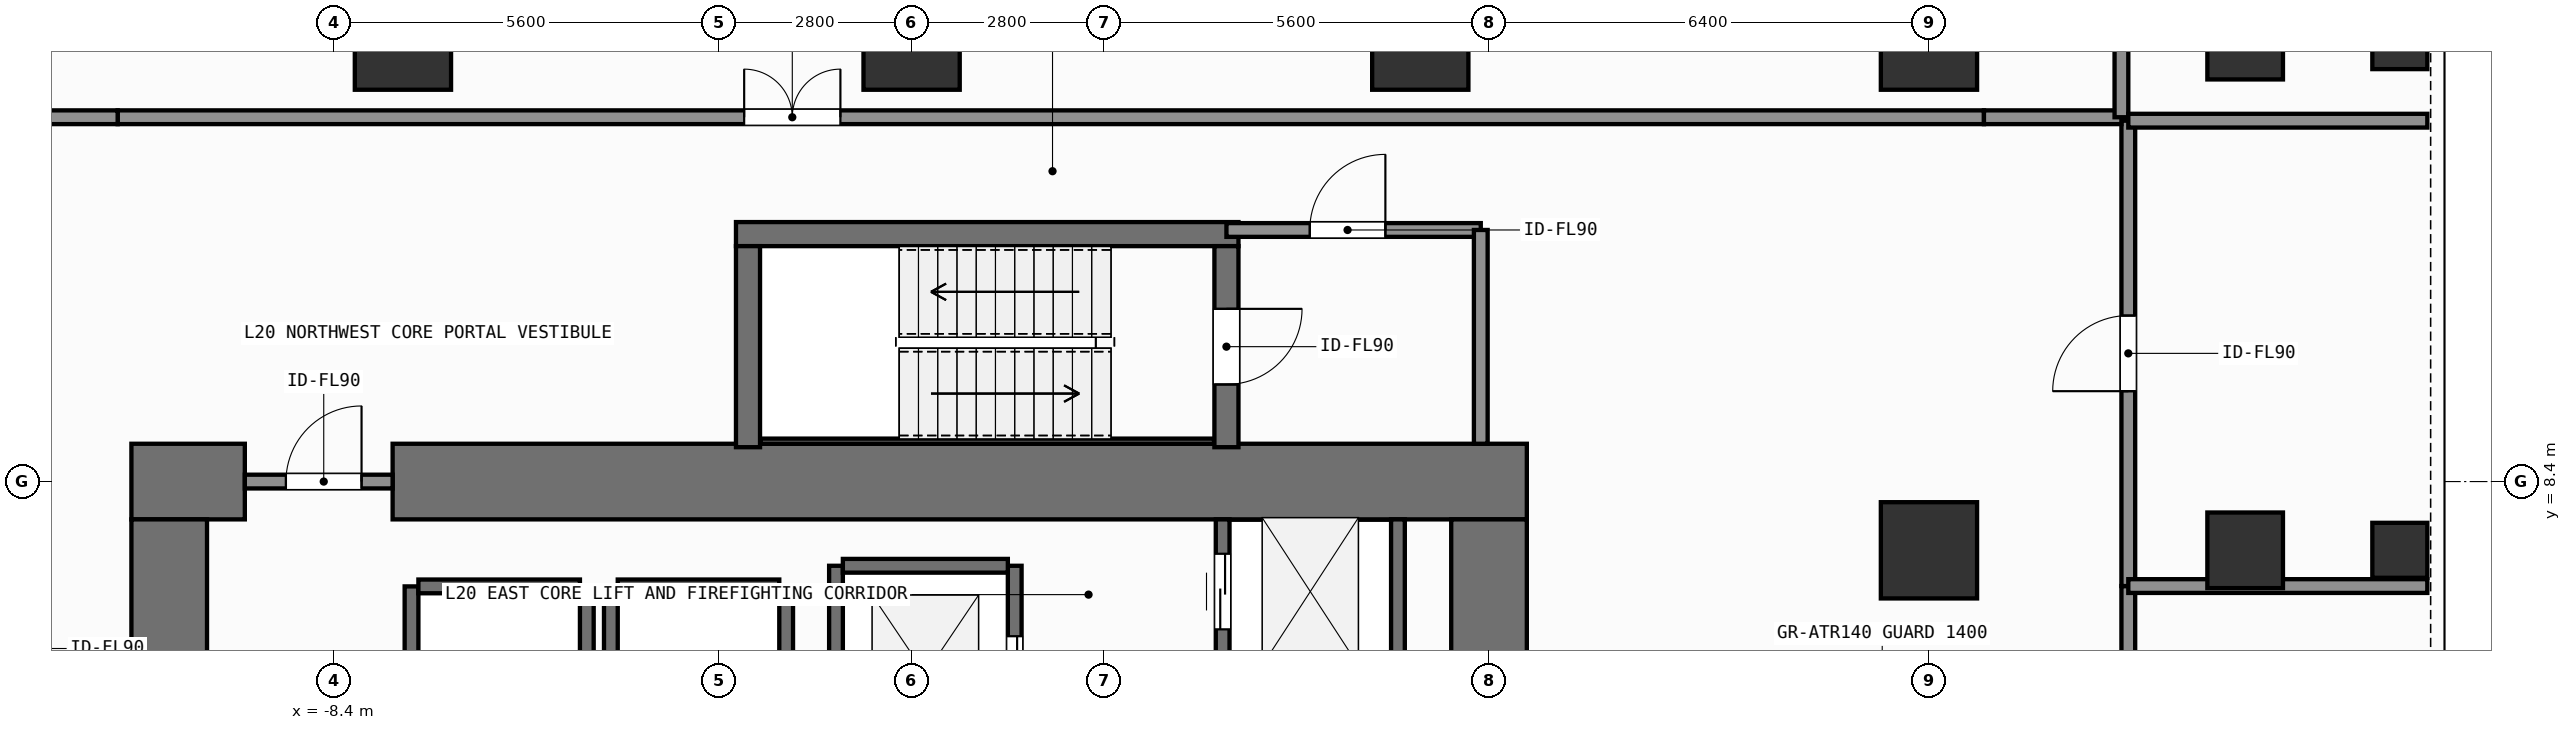
"""IFC4 building model, lengths in metres.
Left out: names, types, materials, properties, quantities, classifications, styles, units other than length and angle.
Written with IfcOpenShell. Run it as: python <this file> out.ifc"""

import sys

from ifc_helpers import new_model, si_unit, direction, frame, frame_2d, origin, origin_2d, place, context, subcontext, project, spatial, rectangle, hollow_rectangle, extrude, element, fill, save


model = new_model("IFC4")
c1 = context("Model", 3, precision=1e-05, world=origin(), true_north=direction((0.0, 1.0)))
c2 = subcontext(c1, "Body", "Model", "MODEL_VIEW")
j1 = project(units=[si_unit("LENGTHUNIT", "METRE"), si_unit("PLANEANGLEUNIT", "RADIAN")], contexts=[c1])
p1 = place(None, origin())
s1 = spatial("IfcSite", under=j1, at=p1, CompositionType="ELEMENT")
p2 = place(p1, origin())
s2 = spatial("IfcBuilding", under=s1, at=p2, CompositionType="ELEMENT")
p3 = place(p2, frame((0.0, 0.0, 77.4)))
s3 = spatial("IfcBuildingStorey", under=s2, at=p3, CompositionType="ELEMENT", Elevation=77.4)
p4 = place(p3, frame((-11.35, 8.4, 0.0), z_axis=(0.0, 0.0, 1.0), x_axis=(1.0, 0.0, 0.0)))
e1 = element("IfcWall", 1, at=p4, inside=s3, PredefinedType="SHEAR", context=c2, shape_type="SweptSolid", body=[
    extrude(rectangle(XDim=1.65, YDim=1.1, at=frame_2d((0.825, 0.0))), origin(), (0.0, 0.0, 1.0), 7.8),
])
p5 = place(p3, frame((-7.55, 8.4, 0.0), z_axis=(0.0, 0.0, 1.0), x_axis=(1.0, 0.0, 0.0)))
e2 = element("IfcWall", 2, at=p5, inside=s3, PredefinedType="SHEAR", context=c2, shape_type="SweptSolid", body=[
    extrude(rectangle(XDim=16.5, YDim=1.1, at=frame_2d((8.25, 0.0))), origin(), (0.0, 0.0, 1.0), 7.8),
])
p6 = place(p3, frame((-10.8, -7.85, 0.0), z_axis=(0.0, 0.0, 1.0), x_axis=(0.0, 1.0, 0.0)))
e3 = element("IfcWall", 3, at=p6, inside=s3, PredefinedType="SHEAR", context=c2, shape_type="SweptSolid", body=[
    extrude(rectangle(XDim=15.7, YDim=1.1, at=frame_2d((7.85, 0.0))), origin(), (0.0, 0.0, 1.0), 7.8),
])
p7 = place(p3, frame((8.4, 5.825, 0.0), z_axis=(0.0, 0.0, 1.0), x_axis=(0.0, 1.0, 0.0)))
e4 = element("IfcWall", 4, at=p7, inside=s3, PredefinedType="SHEAR", context=c2, shape_type="SweptSolid", body=[
    extrude(rectangle(XDim=2.025, YDim=1.1, at=frame_2d((1.013, 0.0))), origin(), (0.0, 0.0, 1.0), 7.8),
])
p8 = place(p3, frame((-2.555, 12.0, 0.0), z_axis=(0.0, 0.0, 1.0), x_axis=(1.0, 0.0, 0.0)))
e5 = element("IfcWall", 5, at=p8, inside=s3, PredefinedType="SHEAR", context=c2, shape_type="SweptSolid", body=[
    extrude(rectangle(XDim=7.31, YDim=0.35, at=frame_2d((3.655, 0.0))), origin(), (0.0, 0.0, 1.0), 7.8),
])
p9 = place(p3, frame((-2.2, 8.988, 0.0), z_axis=(0.0, 0.0, 1.0), x_axis=(1.0, 0.0, 0.0)))
e6 = element("IfcWall", 6, at=p9, inside=s3, PredefinedType="SHEAR", context=c2, shape_type="SweptSolid", body=[
    extrude(rectangle(XDim=6.6, YDim=0.075, at=frame_2d((3.3, 0.0))), origin(), (0.0, 0.0, 1.0), 7.8),
])
p10 = place(p3, frame((-2.38, 8.9, 0.0), z_axis=(0.0, 0.0, 1.0), x_axis=(0.0, 1.0, 0.0)))
e7 = element("IfcWall", 7, at=p10, inside=s3, PredefinedType="SHEAR", context=c2, shape_type="SweptSolid", body=[
    extrude(rectangle(XDim=2.925, YDim=0.35, at=frame_2d((1.462, 0.0))), origin(), (0.0, 0.0, 1.0), 7.8),
])
p11 = place(p3, frame((4.58, 11.825, 0.0), z_axis=(0.0, 0.0, 1.0), x_axis=(0.0, -1.0, 0.0)))
e8 = element("IfcWall", 8, at=p11, inside=s3, PredefinedType="SHEAR", context=c2, shape_type="SweptSolid", body=[
    extrude(rectangle(XDim=2.925, YDim=0.35, at=frame_2d((1.462, 0.0))), origin(), (0.0, 0.0, 1.0), 7.8),
])
p12 = place(p11, frame((0.913, 0.0, 0.0)))
e9 = element("IfcOpeningElement", 9, at=p12, cuts=e8, PredefinedType="OPENING", context=c2, shape_type="SweptSolid", body=[
    extrude(rectangle(XDim=1.1, YDim=2.15, at=frame_2d((0.55, 1.075))), frame((0.0, 0.185, 0.0), z_axis=(0.0, -1.0, 0.0), x_axis=(1.0, 0.0, 0.0)), (0.0, 0.0, 1.0), 0.37),
])
for number, where, z_axis, x_axis in (
    (10, (-7.4, 14.8, 0.0), (0.0, 0.0, 1.0), (1.0, 0.0, 0.0)),
    (11, (0.0, 14.8, 0.0), (0.0, 0.0, 1.0), (1.0, 0.0, 0.0)),
    (12, (7.4, 14.8, 0.0), (0.0, 0.0, 1.0), (1.0, 0.0, 0.0)),
    (13, (14.8, 14.8, 0.0), (0.0, 0.0, 1.0), (1.0, 0.0, 0.0)),
    (14, (14.8, 7.4, 0.0), (0.0, 0.0, 1.0), (1.0, 0.0, 0.0)),
):
    element("IfcColumn", number, at=place(p3, frame(where, z_axis=z_axis, x_axis=x_axis)), inside=s3, PredefinedType="COLUMN", context=c2, shape_type="SweptSolid", body=[
        extrude(rectangle(XDim=1.4, YDim=1.4, at=origin_2d()), origin(), (0.0, 0.0, 1.0), 7.8),
    ])
for number, where, z_axis, x_axis in (
    (15, (19.4, 7.4, 0.0), (0.0, 0.0, 1.0), (1.0, 0.0, 0.0)),
    (16, (19.4, 14.8, 0.0), (0.0, 0.0, 1.0), (1.0, 0.0, 0.0)),
):
    element("IfcColumn", number, at=place(p3, frame(where, z_axis=z_axis, x_axis=x_axis)), inside=s3, PredefinedType="COLUMN", context=c2, shape_type="SweptSolid", body=[
        extrude(rectangle(XDim=1.1, YDim=1.1, at=origin_2d()), origin(), (0.0, 0.0, 1.0), 7.8),
    ])
for number, where, z_axis, x_axis in (
    (17, (21.65, 7.4, 0.0), (0.0, 0.0, 1.0), (1.0, 0.0, 0.0)),
    (18, (21.65, 14.8, 0.0), (0.0, 0.0, 1.0), (1.0, 0.0, 0.0)),
):
    element("IfcColumn", number, at=place(p3, frame(where, z_axis=z_axis, x_axis=x_axis)), inside=s3, PredefinedType="COLUMN", context=c2, shape_type="SweptSolid", body=[
        extrude(hollow_rectangle(XDim=0.8, YDim=0.8, WallThickness=0.036, at=origin_2d()), origin(), (0.0, 0.0, 1.0), 7.8),
    ])
for number, where, z_axis, x_axis in (
    (19, (-7.275, 4.075, 0.0), (0.0, 0.0, 1.0), (0.0, 1.0, 0.0)),
    (20, (-4.725, 4.075, 0.0), (0.0, 0.0, 1.0), (0.0, 1.0, 0.0)),
):
    element("IfcWall", number, at=place(p3, frame(where, z_axis=z_axis, x_axis=x_axis)), inside=s3, PredefinedType="SHEAR", context=c2, shape_type="SweptSolid", body=[
        extrude(rectangle(XDim=2.8, YDim=0.2, at=frame_2d((1.4, 0.0))), origin(), (0.0, 0.0, 1.0), 7.52),
    ])
p13 = place(p3, frame((-7.175, 6.875, 0.0), z_axis=(0.0, 0.0, 1.0), x_axis=(1.0, 0.0, 0.0)))
e21 = element("IfcWall", 21, at=p13, inside=s3, PredefinedType="SHEAR", context=c2, shape_type="SweptSolid", body=[
    extrude(rectangle(XDim=2.35, YDim=0.2, at=frame_2d((1.175, 0.0))), origin(), (0.0, 0.0, 1.0), 7.52),
])
for number, where, z_axis, x_axis in (
    (22, (-4.375, 4.325, 0.0), (0.0, 0.0, 1.0), (0.0, 1.0, 0.0)),
    (23, (-1.825, 4.325, 0.0), (0.0, 0.0, 1.0), (0.0, 1.0, 0.0)),
):
    element("IfcWall", number, at=place(p3, frame(where, z_axis=z_axis, x_axis=x_axis)), inside=s3, PredefinedType="SHEAR", context=c2, shape_type="SweptSolid", body=[
        extrude(rectangle(XDim=2.55, YDim=0.2, at=frame_2d((1.275, 0.0))), origin(), (0.0, 0.0, 1.0), 7.52),
    ])
p14 = place(p3, frame((-4.275, 6.875, 0.0), z_axis=(0.0, 0.0, 1.0), x_axis=(1.0, 0.0, 0.0)))
e24 = element("IfcWall", 24, at=p14, inside=s3, PredefinedType="SHEAR", context=c2, shape_type="SweptSolid", body=[
    extrude(rectangle(XDim=2.35, YDim=0.2, at=frame_2d((1.175, 0.0))), origin(), (0.0, 0.0, 1.0), 7.52),
])
p15 = place(p3, frame((-1.1, 4.025, 0.0), z_axis=(0.0, 0.0, 1.0), x_axis=(0.0, 1.0, 0.0)))
e25 = element("IfcWall", 25, at=p15, inside=s3, PredefinedType="SHEAR", context=c2, shape_type="SweptSolid", body=[
    extrude(rectangle(XDim=3.15, YDim=0.2, at=frame_2d((1.575, 0.0))), origin(), (0.0, 0.0, 1.0), 7.52),
])
p16 = place(p3, frame((1.5, 4.025, 0.0), z_axis=(0.0, 0.0, 1.0), x_axis=(0.0, 1.0, 0.0)))
e26 = element("IfcWall", 26, at=p16, inside=s3, PredefinedType="SHEAR", context=c2, shape_type="SweptSolid", body=[
    extrude(rectangle(XDim=3.15, YDim=0.2, at=frame_2d((1.575, 0.0))), origin(), (0.0, 0.0, 1.0), 7.52),
])
p17 = place(p16, frame((1.025, 0.0, 0.0)))
e27 = element("IfcOpeningElement", 27, at=p17, cuts=e26, PredefinedType="OPENING", context=c2, shape_type="SweptSolid", body=[
    extrude(rectangle(XDim=1.1, YDim=2.2, at=frame_2d((0.55, 1.1))), frame((0.0, 0.11, 0.0), z_axis=(0.0, -1.0, 0.0), x_axis=(1.0, 0.0, 0.0)), (0.0, 0.0, 1.0), 0.22),
])
p18 = place(p3, frame((-1.0, 7.175, 0.0), z_axis=(0.0, 0.0, 1.0), x_axis=(1.0, 0.0, 0.0)))
e28 = element("IfcWall", 28, at=p18, inside=s3, PredefinedType="SHEAR", context=c2, shape_type="SweptSolid", body=[
    extrude(rectangle(XDim=2.4, YDim=0.2, at=frame_2d((1.2, 0.0))), origin(), (0.0, 0.0, 1.0), 7.52),
])
p19 = place(p3, frame((4.525, 5.825, 0.0), z_axis=(0.0, 0.0, 1.0), x_axis=(0.0, 1.0, 0.0)))
e29 = element("IfcWall", 29, at=p19, inside=s3, PredefinedType="SHEAR", context=c2, shape_type="SweptSolid", body=[
    extrude(rectangle(XDim=2.025, YDim=0.2, at=frame_2d((1.013, 0.0))), origin(), (0.0, 0.0, 1.0), 7.52),
])
p20 = place(p19, frame((0.425, 0.0, 0.0)))
e30 = element("IfcOpeningElement", 30, at=p20, cuts=e29, PredefinedType="OPENING", context=c2, shape_type="SweptSolid", body=[
    extrude(rectangle(XDim=1.1, YDim=2.2, at=frame_2d((0.55, 1.1))), frame((0.0, 0.11, 0.0), z_axis=(0.0, -1.0, 0.0), x_axis=(1.0, 0.0, 0.0)), (0.0, 0.0, 1.0), 0.22),
])
p21 = place(p3, frame((7.075, 5.825, 0.0), z_axis=(0.0, 0.0, 1.0), x_axis=(0.0, 1.0, 0.0)))
e31 = element("IfcWall", 31, at=p21, inside=s3, PredefinedType="SHEAR", context=c2, shape_type="SweptSolid", body=[
    extrude(rectangle(XDim=2.025, YDim=0.2, at=frame_2d((1.013, 0.0))), origin(), (0.0, 0.0, 1.0), 7.52),
])
p22 = place(p3, frame((4.58, 12.06, 0.0), z_axis=(0.0, 0.0, 1.0), x_axis=(1.0, 0.0, 0.0)))
e32 = element("IfcWall", 32, at=p22, inside=s3, PredefinedType="SOLIDWALL", context=c2, shape_type="SweptSolid", body=[
    extrude(rectangle(XDim=3.7, YDim=0.2, at=frame_2d((1.85, 0.0))), origin(), (0.0, 0.0, 1.0), 7.52),
])
p23 = place(p22, frame((1.212, 0.0, 0.0)))
e33 = element("IfcOpeningElement", 33, at=p23, cuts=e32, PredefinedType="OPENING", context=c2, shape_type="SweptSolid", body=[
    extrude(rectangle(XDim=1.1, YDim=2.15, at=frame_2d((0.55, 1.075))), frame((0.0, 0.11, 0.0), z_axis=(0.0, -1.0, 0.0), x_axis=(1.0, 0.0, 0.0)), (0.0, 0.0, 1.0), 0.22),
])
p24 = place(p3, frame((-9.7, 8.4, 0.0), z_axis=(0.0, 0.0, 1.0), x_axis=(1.0, 0.0, 0.0)))
e34 = element("IfcWall", 34, at=p24, inside=s3, PredefinedType="SOLIDWALL", context=c2, shape_type="SweptSolid", body=[
    extrude(rectangle(XDim=2.15, YDim=0.2, at=frame_2d((1.075, 0.0))), origin(), (0.0, 0.0, 1.0), 6.56),
])
p25 = place(p24, frame((0.598, 0.0, 0.0)))
e35 = element("IfcOpeningElement", 35, at=p25, cuts=e34, PredefinedType="OPENING", context=c2, shape_type="SweptSolid", body=[
    extrude(rectangle(XDim=1.1, YDim=2.15, at=frame_2d((0.55, 1.075))), frame((0.0, 0.11, 0.0), z_axis=(0.0, -1.0, 0.0), x_axis=(1.0, 0.0, 0.0)), (0.0, 0.0, 1.0), 0.22),
])
p26 = place(p3, frame((-11.55, 13.7, 0.0), z_axis=(0.0, 0.0, 1.0), x_axis=(1.0, 0.0, 0.0)))
e36 = element("IfcWall", 36, at=p26, inside=s3, PredefinedType="SOLIDWALL", context=c2, shape_type="SweptSolid", body=[
    extrude(rectangle(XDim=27.15, YDim=0.2, at=frame_2d((13.575, 0.0))), origin(), (0.0, 0.0, 1.0), 7.52),
])
p27 = place(p26, frame((9.114, 0.0, 0.0)))
e37 = element("IfcOpeningElement", 37, at=p27, cuts=e36, PredefinedType="OPENING", context=c2, shape_type="SweptSolid", body=[
    extrude(rectangle(XDim=1.4, YDim=2.2, at=frame_2d((0.7, 1.1))), frame((0.0, 0.11, 0.0), z_axis=(0.0, -1.0, 0.0), x_axis=(1.0, 0.0, 0.0)), (0.0, 0.0, 1.0), 0.22),
])
p28 = place(p3, frame((17.7, 2.58, 0.0), z_axis=(0.0, 0.0, 1.0), x_axis=(0.0, 1.0, 0.0)))
e38 = element("IfcWall", 38, at=p28, inside=s3, PredefinedType="SOLIDWALL", context=c2, shape_type="SweptSolid", body=[
    extrude(rectangle(XDim=4.3, YDim=0.2, at=frame_2d((2.15, 0.0))), origin(), (0.0, 0.0, 1.0), 7.52),
])
p29 = place(p28, frame((1.725, 0.0, 0.0)))
e39 = element("IfcOpeningElement", 39, at=p29, cuts=e38, PredefinedType="OPENING", context=c2, shape_type="SweptSolid", body=[
    extrude(rectangle(XDim=0.85, YDim=2.1, at=frame_2d((0.425, 1.05))), frame((0.0, 0.11, 0.0), z_axis=(0.0, -1.0, 0.0), x_axis=(1.0, 0.0, 0.0)), (0.0, 0.0, 1.0), 0.22),
])
p30 = place(p3, frame((17.7, 6.88, 0.0), z_axis=(0.0, 0.0, 1.0), x_axis=(0.0, 1.0, 0.0)))
e40 = element("IfcWall", 40, at=p30, inside=s3, PredefinedType="SOLIDWALL", context=c2, shape_type="SweptSolid", body=[
    extrude(rectangle(XDim=6.77, YDim=0.2, at=frame_2d((3.385, 0.0))), origin(), (0.0, 0.0, 1.0), 7.52),
])
p31 = place(p30, frame((2.835, 0.0, 0.0)))
e41 = element("IfcOpeningElement", 41, at=p31, cuts=e40, PredefinedType="OPENING", context=c2, shape_type="SweptSolid", body=[
    extrude(rectangle(XDim=1.1, YDim=2.15, at=frame_2d((0.55, 1.075))), frame((0.0, 0.11, 0.0), z_axis=(0.0, -1.0, 0.0), x_axis=(1.0, 0.0, 0.0)), (0.0, 0.0, 1.0), 0.22),
])
p32 = place(p3, frame((8.28, 8.95, 0.0), z_axis=(0.0, 0.0, 1.0), x_axis=(0.0, 1.0, 0.0)))
e42 = element("IfcWall", 42, at=p32, inside=s3, PredefinedType="SOLIDWALL", context=c2, shape_type="SweptSolid", body=[
    extrude(rectangle(XDim=3.11, YDim=0.2, at=frame_2d((1.555, 0.0))), origin(), (0.0, 0.0, 1.0), 7.52),
])
p33 = place(p3, frame((-13.5, 13.7, 0.0), z_axis=(0.0, 0.0, 1.0), x_axis=(1.0, 0.0, 0.0)))
e43 = element("IfcWall", 43, at=p33, inside=s3, PredefinedType="SOLIDWALL", context=c2, shape_type="SweptSolid", body=[
    extrude(rectangle(XDim=1.95, YDim=0.2, at=frame_2d((0.975, 0.0))), origin(), (0.0, 0.0, 1.0), 7.52),
])
p34 = place(p3, frame((15.6, 13.7, 0.0), z_axis=(0.0, 0.0, 1.0), x_axis=(1.0, 0.0, 0.0)))
e44 = element("IfcWall", 44, at=p34, inside=s3, PredefinedType="SOLIDWALL", context=c2, shape_type="SweptSolid", body=[
    extrude(rectangle(XDim=2.0, YDim=0.2, at=frame_2d((1.0, 0.0))), origin(), (0.0, 0.0, 1.0), 7.52),
])
p35 = place(p3, frame((17.6, 13.7, 0.0), z_axis=(0.0, 0.0, 1.0), x_axis=(0.0, 1.0, 0.0)))
e45 = element("IfcWall", 45, at=p35, inside=s3, PredefinedType="SOLIDWALL", context=c2, shape_type="SweptSolid", body=[
    extrude(rectangle(XDim=11.25, YDim=0.2, at=frame_2d((5.625, 0.0))), origin(), (0.0, 0.0, 1.0), 7.52),
])
for number, where, z_axis, x_axis in (
    (46, (17.7, 13.65, 0.0), (0.0, 0.0, 1.0), (1.0, 0.0, 0.0)),
    (47, (17.7, 6.88, 0.0), (0.0, 0.0, 1.0), (1.0, 0.0, 0.0)),
):
    element("IfcWall", number, at=place(p3, frame(where, z_axis=z_axis, x_axis=x_axis)), inside=s3, PredefinedType="SOLIDWALL", context=c2, shape_type="SweptSolid", body=[
        extrude(rectangle(XDim=4.35, YDim=0.2, at=frame_2d((2.175, 0.0))), origin(), (0.0, 0.0, 1.0), 7.52),
    ])
p36 = place(p17, origin())
e48 = element("IfcDoor", 48, at=p36, inside=s3, OperationType="SLIDING_TO_LEFT", PredefinedType="DOOR", context=c2, shape_type="SweptSolid", body=[
    extrude(rectangle(XDim=1.1, YDim=2.2, at=frame_2d((0.55, 1.1))), frame((0.0, 0.025, 0.0), z_axis=(0.0, -1.0, 0.0), x_axis=(1.0, 0.0, 0.0)), (0.0, 0.0, 1.0), 0.05),
])
fill(e27, e48)
p37 = place(p20, origin())
e49 = element("IfcDoor", 49, at=p37, inside=s3, OperationType="SLIDING_TO_LEFT", PredefinedType="DOOR", context=c2, shape_type="SweptSolid", body=[
    extrude(rectangle(XDim=1.1, YDim=2.2, at=frame_2d((0.55, 1.1))), frame((0.0, 0.025, 0.0), z_axis=(0.0, -1.0, 0.0), x_axis=(1.0, 0.0, 0.0)), (0.0, 0.0, 1.0), 0.05),
])
fill(e30, e49)
p38 = place(p12, origin())
e50 = element("IfcDoor", 50, at=p38, inside=s3, OperationType="SINGLE_SWING_LEFT", PredefinedType="DOOR", context=c2, shape_type="SweptSolid", body=[
    extrude(rectangle(XDim=1.1, YDim=2.15, at=frame_2d((0.55, 1.075))), frame((0.0, 0.025, 0.0), z_axis=(0.0, -1.0, 0.0), x_axis=(1.0, 0.0, 0.0)), (0.0, 0.0, 1.0), 0.05),
])
fill(e9, e50)
p39 = place(p23, origin())
e51 = element("IfcDoor", 51, at=p39, inside=s3, OperationType="SINGLE_SWING_RIGHT", PredefinedType="DOOR", context=c2, shape_type="SweptSolid", body=[
    extrude(rectangle(XDim=1.1, YDim=2.15, at=frame_2d((0.55, 1.075))), frame((0.0, 0.025, 0.0), z_axis=(0.0, -1.0, 0.0), x_axis=(1.0, 0.0, 0.0)), (0.0, 0.0, 1.0), 0.05),
])
fill(e33, e51)
p40 = place(p25, origin())
e52 = element("IfcDoor", 52, at=p40, inside=s3, OperationType="SINGLE_SWING_RIGHT", PredefinedType="DOOR", context=c2, shape_type="SweptSolid", body=[
    extrude(rectangle(XDim=1.1, YDim=2.15, at=frame_2d((0.55, 1.075))), frame((0.0, 0.025, 0.0), z_axis=(0.0, -1.0, 0.0), x_axis=(1.0, 0.0, 0.0)), (0.0, 0.0, 1.0), 0.05),
])
fill(e35, e52)
p41 = place(p27, origin())
e53 = element("IfcDoor", 53, at=p41, inside=s3, OperationType="SINGLE_SWING_LEFT", PredefinedType="DOOR", context=c2, shape_type="SweptSolid", body=[
    extrude(rectangle(XDim=1.4, YDim=2.2, at=frame_2d((0.7, 1.1))), frame((0.0, 0.025, 0.0), z_axis=(0.0, -1.0, 0.0), x_axis=(1.0, 0.0, 0.0)), (0.0, 0.0, 1.0), 0.05),
])
fill(e37, e53)
p42 = place(p31, origin())
e54 = element("IfcDoor", 54, at=p42, inside=s3, OperationType="SINGLE_SWING_LEFT", PredefinedType="DOOR", context=c2, shape_type="SweptSolid", body=[
    extrude(rectangle(XDim=1.1, YDim=2.15, at=frame_2d((0.55, 1.075))), frame((0.0, 0.025, 0.0), z_axis=(0.0, -1.0, 0.0), x_axis=(1.0, 0.0, 0.0)), (0.0, 0.0, 1.0), 0.05),
])
fill(e41, e54)
save(model, sys.argv[1])
